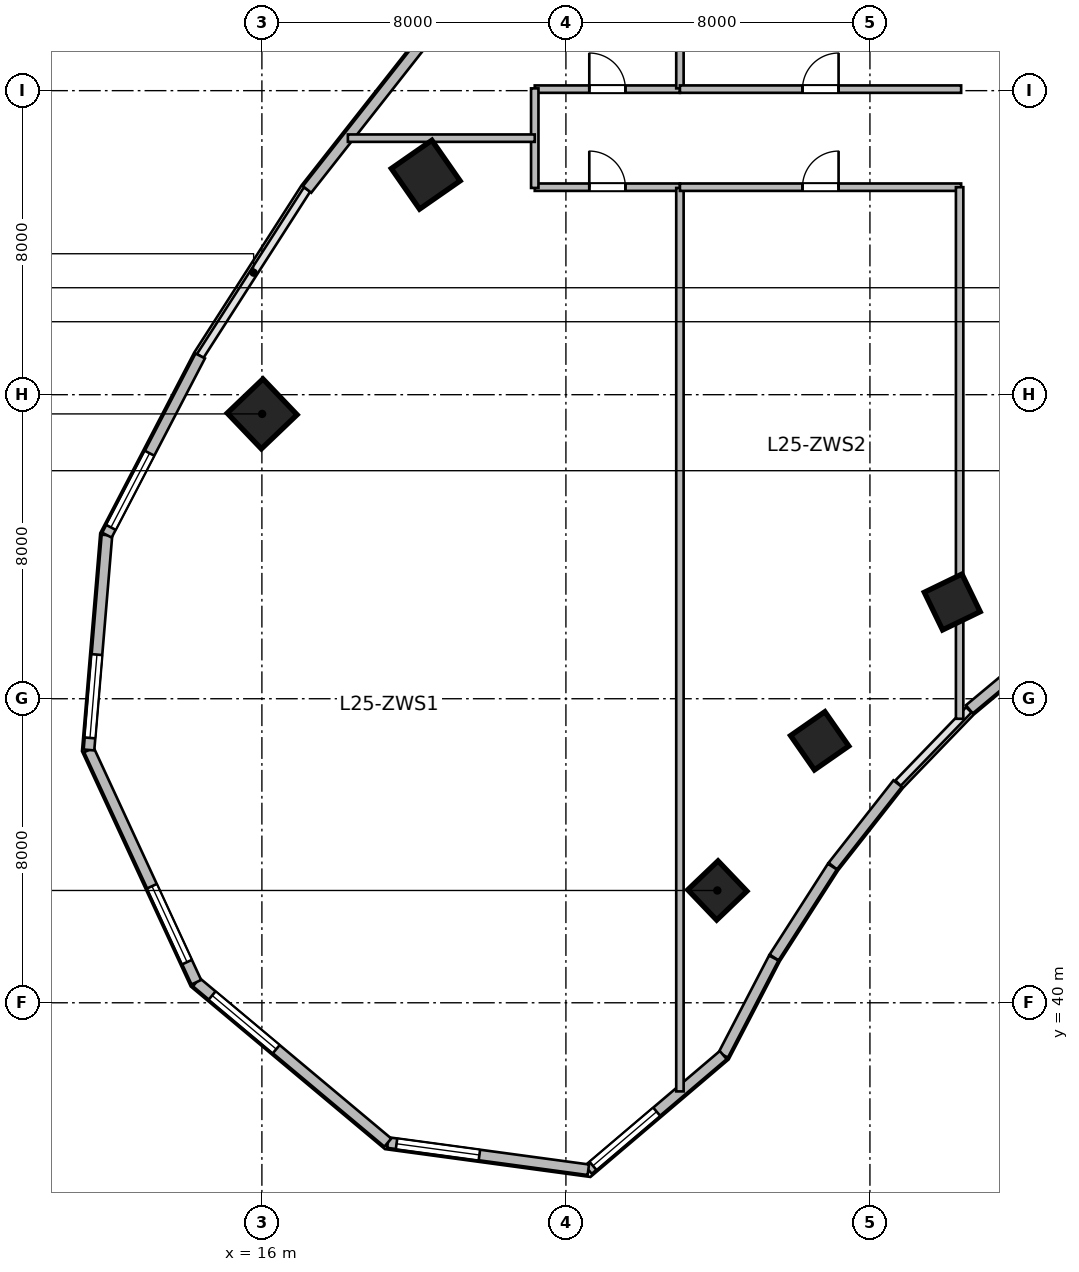
"""IFC4 building model, lengths in metres.
Left out: names, types, materials, properties, quantities, classifications, styles, units other than length and angle.
Written with IfcOpenShell. Run it as: python <this file> out.ifc"""

import sys

from ifc_helpers import new_model, si_unit, direction, frame, frame_2d, origin, origin_2d, place, context, subcontext, project, spatial, rectangle, extrude, source, transform, mapped, element, fill, save


model = new_model("IFC4")
c1 = context("Model", 3, precision=1e-05, world=origin(), true_north=direction((0.0, 1.0)))
c2 = subcontext(c1, "Body", "Model", "MODEL_VIEW")
j1 = project(units=[si_unit("LENGTHUNIT", "METRE"), si_unit("PLANEANGLEUNIT", "RADIAN")], contexts=[c1])
p1 = place(None, origin())
s1 = spatial("IfcSite", under=j1, at=p1, CompositionType="ELEMENT")
p2 = place(p1, origin())
s2 = spatial("IfcBuilding", under=s1, at=p2, CompositionType="ELEMENT")
p3 = place(p2, frame((0.0, 0.0, 107.7)))
s3 = spatial("IfcBuildingStorey", under=s2, at=p3, CompositionType="ELEMENT", Elevation=107.7)
m1 = source(origin(), c2, "Body", "SweptSolid", [
    extrude(rectangle(XDim=1.1, YDim=1.1, at=origin_2d()), origin(), (0.0, 0.0, 1.0), 3.9),
])
p4 = place(p3, frame((27.985, 42.955, 0.0), z_axis=(0.0, 0.0, 1.0), x_axis=(-0.690756218984, 0.723087716626, 0.0)))
e1 = element("IfcColumn", 1, at=p4, inside=s3, PredefinedType="COLUMN", context=c2, shape_type="MappedRepresentation", body=[
    mapped(m1, transform((0.0, 0.0, 0.0), scale=1.0)),
])
m2 = source(origin(), c2, "Body", "SweptSolid", [
    extrude(rectangle(XDim=1.3, YDim=1.3, at=origin_2d()), origin(), (0.0, 0.0, 1.0), 3.9),
])
p5 = place(p3, frame((16.007, 55.494, 0.0), z_axis=(0.0, 0.0, 1.0), x_axis=(-0.690756218984, 0.723087716626, 0.0)))
e2 = element("IfcColumn", 2, at=p5, inside=s3, PredefinedType="COLUMN", context=c2, shape_type="MappedRepresentation", body=[
    mapped(m2, transform((0.0, 0.0, 0.0), scale=1.0)),
])
p6 = place(p3, frame((30.677, 46.892, 0.0), z_axis=(0.0, 0.0, 1.0), x_axis=(-0.571143442153, 0.820850271661, 0.0)))
e3 = element("IfcColumn", 3, at=p6, inside=s3, PredefinedType="COLUMN", context=c2, shape_type="MappedRepresentation", body=[
    mapped(m1, transform((0.0, 0.0, 0.0), scale=1.0)),
])
p7 = place(p3, frame((20.311, 61.789, 0.0), z_axis=(0.0, 0.0, 1.0), x_axis=(-0.571143442153, 0.820850271661, 0.0)))
e4 = element("IfcColumn", 4, at=p7, inside=s3, PredefinedType="COLUMN", context=c2, shape_type="MappedRepresentation", body=[
    mapped(m2, transform((0.0, 0.0, 0.0), scale=1.0)),
])
p8 = place(p3, frame((34.166, 50.545, 0.0), z_axis=(0.0, 0.0, 1.0), x_axis=(-0.436173672171, 0.899862504889, 0.0)))
e5 = element("IfcColumn", 5, at=p8, inside=s3, PredefinedType="COLUMN", context=c2, shape_type="MappedRepresentation", body=[
    mapped(m1, transform((0.0, 0.0, 0.0), scale=1.0)),
])
m3 = source(origin(), c2, "Body", "SweptSolid", [
    extrude(rectangle(XDim=2.601, YDim=0.28, at=frame_2d((1.3, 0.0))), origin(), (0.0, 0.0, 1.0), 3.65),
])
p9 = place(p3, frame((36.613, 49.387, 0.0), z_axis=(0.0, 0.0, 1.0), x_axis=(-0.76796730295, -0.640489048775, 0.0)))
e6 = element("IfcWall", 6, at=p9, inside=s3, PredefinedType="SOLIDWALL", context=c2, shape_type="MappedRepresentation", body=[
    mapped(m3, transform((0.0, 0.0, 0.0), scale=1.0)),
])
m4 = source(origin(), c2, "Body", "SweptSolid", [
    extrude(rectangle(XDim=2.76, YDim=0.28, at=frame_2d((1.38, 0.0))), origin(), (0.0, 0.0, 1.0), 3.65),
])
p10 = place(p3, frame((32.728, 45.766, 0.0), z_axis=(0.0, 0.0, 1.0), x_axis=(-0.618180818641, -0.786035925047, 0.0)))
e7 = element("IfcWall", 7, at=p10, inside=s3, PredefinedType="SOLIDWALL", context=c2, shape_type="MappedRepresentation", body=[
    mapped(m4, transform((0.0, 0.0, 0.0), scale=1.0)),
])
m5 = source(origin(), c2, "Body", "SweptSolid", [
    extrude(rectangle(XDim=2.84, YDim=0.28, at=frame_2d((1.42, 0.0))), origin(), (0.0, 0.0, 1.0), 3.65),
])
p11 = place(p3, frame((31.011, 43.582, 0.0), z_axis=(0.0, 0.0, 1.0), x_axis=(-0.540214368057, -0.841527442538, 0.0)))
e8 = element("IfcWall", 8, at=p11, inside=s3, PredefinedType="SOLIDWALL", context=c2, shape_type="MappedRepresentation", body=[
    mapped(m5, transform((0.0, 0.0, 0.0), scale=1.0)),
])
m6 = source(origin(), c2, "Body", "SweptSolid", [
    extrude(rectangle(XDim=2.88, YDim=0.28, at=frame_2d((1.44, 0.0))), origin(), (0.0, 0.0, 1.0), 3.65),
])
p12 = place(p3, frame((29.469, 41.178, 0.0), z_axis=(0.0, 0.0, 1.0), x_axis=(-0.461769086658, -0.887000175088, 0.0)))
e9 = element("IfcWall", 9, at=p12, inside=s3, PredefinedType="SOLIDWALL", context=c2, shape_type="MappedRepresentation", body=[
    mapped(m6, transform((0.0, 0.0, 0.0), scale=1.0)),
])
m7 = source(origin(), c2, "Body", "SweptSolid", [
    extrude(rectangle(XDim=4.659, YDim=0.28, at=frame_2d((2.33, 0.0))), origin(), (0.0, 0.0, 1.0), 3.65),
])
p13 = place(p3, frame((28.139, 38.624, 0.0), z_axis=(0.0, 0.0, 1.0), x_axis=(-0.761913458795, -0.647678841176, 0.0)))
e10 = element("IfcWall", 10, at=p13, inside=s3, PredefinedType="SOLIDWALL", context=c2, shape_type="MappedRepresentation", body=[
    mapped(m7, transform((0.0, 0.0, 0.0), scale=1.0)),
])
p14 = place(p13, frame((2.299, 0.0, 0.95)))
e11 = element("IfcOpeningElement", 11, at=p14, cuts=e10, PredefinedType="OPENING", context=c2, shape_type="SweptSolid", body=[
    extrude(rectangle(XDim=2.2, YDim=2.1, at=frame_2d((1.1, 1.05))), frame((0.0, 0.15, 0.0), z_axis=(0.0, -1.0, 0.0), x_axis=(1.0, 0.0, 0.0)), (0.0, 0.0, 1.0), 0.3),
])
m8 = source(origin(), c2, "Body", "SweptSolid", [
    extrude(rectangle(XDim=5.324, YDim=0.28, at=frame_2d((2.662, 0.0))), origin(), (0.0, 0.0, 1.0), 3.65),
])
p15 = place(p3, frame((24.59, 35.606, 0.0), z_axis=(0.0, 0.0, 1.0), x_axis=(-0.990931467223, 0.134368252451, 0.0)))
e12 = element("IfcWall", 12, at=p15, inside=s3, PredefinedType="SOLIDWALL", context=c2, shape_type="MappedRepresentation", body=[
    mapped(m8, transform((0.0, 0.0, 0.0), scale=1.0)),
])
p16 = place(p15, frame((2.893, 0.0, 0.95)))
e13 = element("IfcOpeningElement", 13, at=p16, cuts=e12, PredefinedType="OPENING", context=c2, shape_type="SweptSolid", body=[
    extrude(rectangle(XDim=2.2, YDim=2.1, at=frame_2d((1.1, 1.05))), frame((0.0, 0.15, 0.0), z_axis=(0.0, -1.0, 0.0), x_axis=(1.0, 0.0, 0.0)), (0.0, 0.0, 1.0), 0.3),
])
m9 = source(origin(), c2, "Body", "SweptSolid", [
    extrude(rectangle(XDim=6.573, YDim=0.28, at=frame_2d((3.287, 0.0))), origin(), (0.0, 0.0, 1.0), 3.65),
])
p17 = place(p3, frame((19.314, 36.322, 0.0), z_axis=(0.0, 0.0, 1.0), x_axis=(-0.766715154163, 0.641987439423, 0.0)))
e14 = element("IfcWall", 14, at=p17, inside=s3, PredefinedType="SOLIDWALL", context=c2, shape_type="MappedRepresentation", body=[
    mapped(m9, transform((0.0, 0.0, 0.0), scale=1.0)),
])
p18 = place(p17, frame((3.83, 0.0, 0.95)))
e15 = element("IfcOpeningElement", 15, at=p18, cuts=e14, PredefinedType="OPENING", context=c2, shape_type="SweptSolid", body=[
    extrude(rectangle(XDim=2.2, YDim=2.1, at=frame_2d((1.1, 1.05))), frame((0.0, 0.15, 0.0), z_axis=(0.0, -1.0, 0.0), x_axis=(1.0, 0.0, 0.0)), (0.0, 0.0, 1.0), 0.3),
])
m10 = source(origin(), c2, "Body", "SweptSolid", [
    extrude(rectangle(XDim=6.732, YDim=0.28, at=frame_2d((3.366, 0.0))), origin(), (0.0, 0.0, 1.0), 3.65),
])
p19 = place(p3, frame((14.275, 40.541, 0.0), z_axis=(0.0, 0.0, 1.0), x_axis=(-0.419644552709, 0.907688520023, 0.0)))
e16 = element("IfcWall", 16, at=p19, inside=s3, PredefinedType="SOLIDWALL", context=c2, shape_type="MappedRepresentation", body=[
    mapped(m10, transform((0.0, 0.0, 0.0), scale=1.0)),
])
p20 = place(p19, frame((0.583, 0.0, 0.95)))
e17 = element("IfcOpeningElement", 17, at=p20, cuts=e16, PredefinedType="OPENING", context=c2, shape_type="SweptSolid", body=[
    extrude(rectangle(XDim=2.2, YDim=2.1, at=frame_2d((1.1, 1.05))), frame((0.0, 0.15, 0.0), z_axis=(0.0, -1.0, 0.0), x_axis=(1.0, 0.0, 0.0)), (0.0, 0.0, 1.0), 0.3),
])
m11 = source(origin(), c2, "Body", "SweptSolid", [
    extrude(rectangle(XDim=5.674, YDim=0.28, at=frame_2d((2.837, 0.0))), origin(), (0.0, 0.0, 1.0), 3.65),
])
p21 = place(p3, frame((11.45, 46.652, 0.0), z_axis=(0.0, 0.0, 1.0), x_axis=(0.083309007867, 0.996523762491, 0.0)))
e18 = element("IfcWall", 18, at=p21, inside=s3, PredefinedType="SOLIDWALL", context=c2, shape_type="MappedRepresentation", body=[
    mapped(m11, transform((0.0, 0.0, 0.0), scale=1.0)),
])
p22 = place(p21, frame((0.318, 0.0, 0.95)))
e19 = element("IfcOpeningElement", 19, at=p22, cuts=e18, PredefinedType="OPENING", context=c2, shape_type="SweptSolid", body=[
    extrude(rectangle(XDim=2.2, YDim=2.1, at=frame_2d((1.1, 1.05))), frame((0.0, 0.15, 0.0), z_axis=(0.0, -1.0, 0.0), x_axis=(1.0, 0.0, 0.0)), (0.0, 0.0, 1.0), 0.3),
])
m12 = source(origin(), c2, "Body", "SweptSolid", [
    extrude(rectangle(XDim=5.315, YDim=0.28, at=frame_2d((2.658, 0.0))), origin(), (0.0, 0.0, 1.0), 3.65),
])
p23 = place(p3, frame((11.922, 52.305, 0.0), z_axis=(0.0, 0.0, 1.0), x_axis=(0.461760527822, 0.887004630735, 0.0)))
e20 = element("IfcWall", 20, at=p23, inside=s3, PredefinedType="SOLIDWALL", context=c2, shape_type="MappedRepresentation", body=[
    mapped(m12, transform((0.0, 0.0, 0.0), scale=1.0)),
])
p24 = place(p23, frame((0.229, 0.0, 0.95)))
e21 = element("IfcOpeningElement", 21, at=p24, cuts=e20, PredefinedType="OPENING", context=c2, shape_type="SweptSolid", body=[
    extrude(rectangle(XDim=2.2, YDim=2.1, at=frame_2d((1.1, 1.05))), frame((0.0, 0.15, 0.0), z_axis=(0.0, -1.0, 0.0), x_axis=(1.0, 0.0, 0.0)), (0.0, 0.0, 1.0), 0.3),
])
m13 = source(origin(), c2, "Body", "SweptSolid", [
    extrude(rectangle(XDim=5.058, YDim=0.28, at=frame_2d((2.529, 0.0))), origin(), (0.0, 0.0, 1.0), 3.65),
])
p25 = place(p3, frame((17.188, 61.4, 0.0), z_axis=(0.0, 0.0, 1.0), x_axis=(0.618145507434, 0.786063694391, 0.0)))
e22 = element("IfcWall", 22, at=p25, inside=s3, PredefinedType="SOLIDWALL", context=c2, shape_type="MappedRepresentation", body=[
    mapped(m13, transform((0.0, 0.0, 0.0), scale=1.0)),
])
m14 = source(origin(), c2, "Body", "SweptSolid", [
    extrude(rectangle(XDim=3.82, YDim=0.195, at=frame_2d((1.91, 0.0))), origin(), (0.0, 0.0, 1.0), 3.65),
])
p26 = place(p3, frame((23.18, 64.04, 0.0), z_axis=(0.0, 0.0, 1.0), x_axis=(1.0, 0.0, 0.0)))
e23 = element("IfcWall", 23, at=p26, inside=s3, PredefinedType="PARTITIONING", context=c2, shape_type="MappedRepresentation", body=[
    mapped(m14, transform((0.0, 0.0, 0.0), scale=1.0)),
])
p27 = place(p26, frame((1.435, 0.0, 0.0)))
e24 = element("IfcOpeningElement", 24, at=p27, cuts=e23, PredefinedType="OPENING", context=c2, shape_type="SweptSolid", body=[
    extrude(rectangle(XDim=0.95, YDim=2.1, at=frame_2d((0.475, 1.05))), frame((0.0, 0.107, 0.0), z_axis=(0.0, -1.0, 0.0), x_axis=(1.0, 0.0, 0.0)), (0.0, 0.0, 1.0), 0.215),
])
m15 = source(origin(), c2, "Body", "SweptSolid", [
    extrude(rectangle(XDim=7.566, YDim=0.195, at=frame_2d((3.783, 0.0))), origin(), (0.0, 0.0, 1.0), 2.942),
])
p28 = place(p3, frame((27.0, 64.06, 0.0), z_axis=(0.0, 0.0, 1.0), x_axis=(0.0, 1.0, 0.0)))
e25 = element("IfcWall", 25, at=p28, inside=s3, PredefinedType="PARTITIONING", context=c2, shape_type="MappedRepresentation", body=[
    mapped(m15, transform((0.0, 0.0, 0.0), scale=1.0)),
])
m16 = source(origin(), c2, "Body", "SweptSolid", [
    extrude(rectangle(XDim=7.4, YDim=0.195, at=frame_2d((3.7, 0.0))), origin(), (0.0, 0.0, 1.0), 3.65),
])
p29 = place(p3, frame((27.0, 64.04, 0.0), z_axis=(0.0, 0.0, 1.0), x_axis=(1.0, 0.0, 0.0)))
e26 = element("IfcWall", 26, at=p29, inside=s3, PredefinedType="PARTITIONING", context=c2, shape_type="MappedRepresentation", body=[
    mapped(m16, transform((0.0, 0.0, 0.0), scale=1.0)),
])
p30 = place(p29, frame((3.225, 0.0, 0.0)))
e27 = element("IfcOpeningElement", 27, at=p30, cuts=e26, PredefinedType="OPENING", context=c2, shape_type="SweptSolid", body=[
    extrude(rectangle(XDim=0.95, YDim=2.1, at=frame_2d((0.475, 1.05))), frame((0.0, 0.107, 0.0), z_axis=(0.0, -1.0, 0.0), x_axis=(1.0, 0.0, 0.0)), (0.0, 0.0, 1.0), 0.215),
])
p31 = place(p3, frame((23.18, 61.46, 0.0), z_axis=(0.0, 0.0, 1.0), x_axis=(1.0, 0.0, 0.0)))
e28 = element("IfcWall", 28, at=p31, inside=s3, PredefinedType="PARTITIONING", context=c2, shape_type="MappedRepresentation", body=[
    mapped(m14, transform((0.0, 0.0, 0.0), scale=1.0)),
])
p32 = place(p31, frame((1.435, 0.0, 0.0)))
e29 = element("IfcOpeningElement", 29, at=p32, cuts=e28, PredefinedType="OPENING", context=c2, shape_type="SweptSolid", body=[
    extrude(rectangle(XDim=0.95, YDim=2.1, at=frame_2d((0.475, 1.05))), frame((0.0, 0.107, 0.0), z_axis=(0.0, -1.0, 0.0), x_axis=(1.0, 0.0, 0.0)), (0.0, 0.0, 1.0), 0.215),
])
m17 = source(origin(), c2, "Body", "SweptSolid", [
    extrude(rectangle(XDim=23.771, YDim=0.195, at=frame_2d((11.886, 0.0))), origin(), (0.0, 0.0, 1.0), 2.942),
])
p33 = place(p3, frame((27.0, 37.668, 0.0), z_axis=(0.0, 0.0, 1.0), x_axis=(0.0, 1.0, 0.0)))
e30 = element("IfcWall", 30, at=p33, inside=s3, PredefinedType="PARTITIONING", context=c2, shape_type="MappedRepresentation", body=[
    mapped(m17, transform((0.0, 0.0, 0.0), scale=1.0)),
])
p34 = place(p3, frame((27.0, 61.46, 0.0), z_axis=(0.0, 0.0, 1.0), x_axis=(1.0, 0.0, 0.0)))
e31 = element("IfcWall", 31, at=p34, inside=s3, PredefinedType="PARTITIONING", context=c2, shape_type="MappedRepresentation", body=[
    mapped(m16, transform((0.0, 0.0, 0.0), scale=1.0)),
])
p35 = place(p34, frame((3.225, 0.0, 0.0)))
e32 = element("IfcOpeningElement", 32, at=p35, cuts=e31, PredefinedType="OPENING", context=c2, shape_type="SweptSolid", body=[
    extrude(rectangle(XDim=0.95, YDim=2.1, at=frame_2d((0.475, 1.05))), frame((0.0, 0.107, 0.0), z_axis=(0.0, -1.0, 0.0), x_axis=(1.0, 0.0, 0.0)), (0.0, 0.0, 1.0), 0.215),
])
m18 = source(origin(), c2, "Body", "SweptSolid", [
    extrude(rectangle(XDim=13.988, YDim=0.195, at=frame_2d((6.994, 0.0))), origin(), (0.0, 0.0, 1.0), 3.65),
])
p36 = place(p3, frame((34.36, 47.472, 0.0), z_axis=(0.0, 0.0, 1.0), x_axis=(0.0, 1.0, 0.0)))
e33 = element("IfcWall", 33, at=p36, inside=s3, PredefinedType="PARTITIONING", context=c2, shape_type="MappedRepresentation", body=[
    mapped(m18, transform((0.0, 0.0, 0.0), scale=1.0)),
])
m19 = source(origin(), c2, "Body", "SweptSolid", [
    extrude(rectangle(XDim=2.62, YDim=0.195, at=frame_2d((1.31, 0.0))), origin(), (0.0, 0.0, 1.0), 3.65),
])
p37 = place(p3, frame((23.18, 61.44, 0.0), z_axis=(0.0, 0.0, 1.0), x_axis=(0.0, 1.0, 0.0)))
e34 = element("IfcWall", 34, at=p37, inside=s3, PredefinedType="PARTITIONING", context=c2, shape_type="MappedRepresentation", body=[
    mapped(m19, transform((0.0, 0.0, 0.0), scale=1.0)),
])
m20 = source(origin(), c2, "Body", "SweptSolid", [
    extrude(rectangle(XDim=4.917, YDim=0.195, at=frame_2d((2.459, 0.0))), origin(), (0.0, 0.0, 1.0), 3.65),
])
p38 = place(p3, frame((18.262, 62.75, 0.0), z_axis=(0.0, 0.0, 1.0), x_axis=(1.0, 0.0, 0.0)))
e35 = element("IfcWall", 35, at=p38, inside=s3, PredefinedType="PARTITIONING", context=c2, shape_type="MappedRepresentation", body=[
    mapped(m20, transform((0.0, 0.0, 0.0), scale=1.0)),
])
m21 = source(origin(), c2, "Body", "SweptSolid", [
    extrude(rectangle(XDim=2.2, YDim=2.1, at=frame_2d((1.1, 1.05))), frame((0.0, 0.03, 0.0), z_axis=(0.0, -1.0, 0.0), x_axis=(1.0, 0.0, 0.0)), (0.0, 0.0, 1.0), 0.06),
])
p39 = place(p14, origin())
e36 = element("IfcWindow", 36, at=p39, inside=s3, PartitioningType="TRIPLE_PANEL_VERTICAL", PredefinedType="WINDOW", context=c2, shape_type="MappedRepresentation", body=[
    mapped(m21, transform((0.0, 0.0, 0.0), scale=1.0)),
])
fill(e11, e36)
p40 = place(p16, origin())
e37 = element("IfcWindow", 37, at=p40, inside=s3, PartitioningType="TRIPLE_PANEL_VERTICAL", PredefinedType="WINDOW", context=c2, shape_type="MappedRepresentation", body=[
    mapped(m21, transform((0.0, 0.0, 0.0), scale=1.0)),
])
fill(e13, e37)
p41 = place(p18, origin())
e38 = element("IfcWindow", 38, at=p41, inside=s3, PartitioningType="TRIPLE_PANEL_VERTICAL", PredefinedType="WINDOW", context=c2, shape_type="MappedRepresentation", body=[
    mapped(m21, transform((0.0, 0.0, 0.0), scale=1.0)),
])
fill(e15, e38)
p42 = place(p20, origin())
e39 = element("IfcWindow", 39, at=p42, inside=s3, PartitioningType="TRIPLE_PANEL_VERTICAL", PredefinedType="WINDOW", context=c2, shape_type="MappedRepresentation", body=[
    mapped(m21, transform((0.0, 0.0, 0.0), scale=1.0)),
])
fill(e17, e39)
p43 = place(p22, origin())
e40 = element("IfcWindow", 40, at=p43, inside=s3, PartitioningType="TRIPLE_PANEL_VERTICAL", PredefinedType="WINDOW", context=c2, shape_type="MappedRepresentation", body=[
    mapped(m21, transform((0.0, 0.0, 0.0), scale=1.0)),
])
fill(e19, e40)
p44 = place(p24, origin())
e41 = element("IfcWindow", 41, at=p44, inside=s3, PartitioningType="TRIPLE_PANEL_VERTICAL", PredefinedType="WINDOW", context=c2, shape_type="MappedRepresentation", body=[
    mapped(m21, transform((0.0, 0.0, 0.0), scale=1.0)),
])
fill(e21, e41)
m22 = source(origin(), c2, "Body", "SweptSolid", [
    extrude(rectangle(XDim=0.95, YDim=2.1, at=frame_2d((0.475, 1.05))), frame((0.0, 0.025, 0.0), z_axis=(0.0, -1.0, 0.0), x_axis=(1.0, 0.0, 0.0)), (0.0, 0.0, 1.0), 0.05),
])
p45 = place(p27, origin())
e42 = element("IfcDoor", 42, at=p45, inside=s3, OperationType="SINGLE_SWING_LEFT", PredefinedType="DOOR", context=c2, shape_type="MappedRepresentation", body=[
    mapped(m22, transform((0.0, 0.0, 0.0), scale=1.0)),
])
fill(e24, e42)
p46 = place(p30, origin())
e43 = element("IfcDoor", 43, at=p46, inside=s3, OperationType="SINGLE_SWING_RIGHT", PredefinedType="DOOR", context=c2, shape_type="MappedRepresentation", body=[
    mapped(m22, transform((0.0, 0.0, 0.0), scale=1.0)),
])
fill(e27, e43)
p47 = place(p32, origin())
e44 = element("IfcDoor", 44, at=p47, inside=s3, OperationType="SINGLE_SWING_LEFT", PredefinedType="DOOR", context=c2, shape_type="MappedRepresentation", body=[
    mapped(m22, transform((0.0, 0.0, 0.0), scale=1.0)),
])
fill(e29, e44)
p48 = place(p35, origin())
e45 = element("IfcDoor", 45, at=p48, inside=s3, OperationType="SINGLE_SWING_RIGHT", PredefinedType="DOOR", context=c2, shape_type="MappedRepresentation", body=[
    mapped(m22, transform((0.0, 0.0, 0.0), scale=1.0)),
])
fill(e32, e45)
save(model, sys.argv[1])
